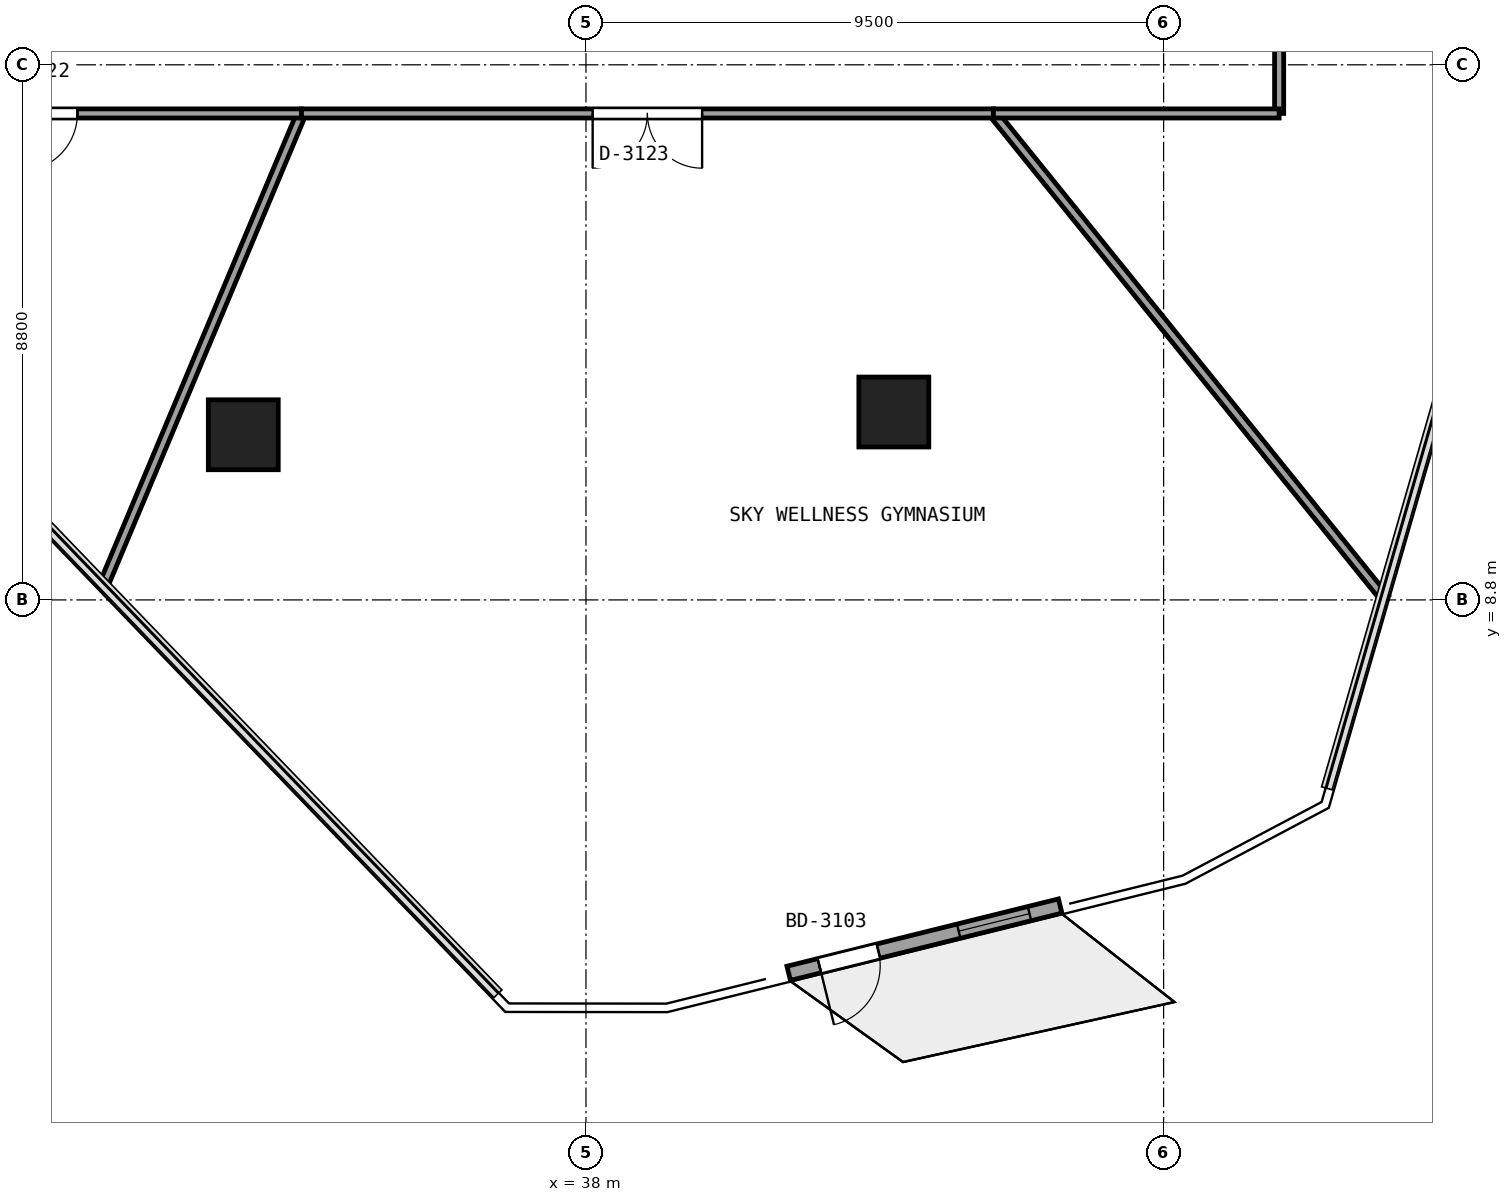
"""IFC4 building model, lengths in metres.
Left out: names, types, materials, properties, quantities, classifications, styles, units other than length and angle.
Written with IfcOpenShell. Run it as: python <this file> out.ifc"""

import sys

from ifc_helpers import new_model, si_unit, direction, frame, frame_2d, origin, origin_2d, place, context, subcontext, project, spatial, rectangle, extrude, element, fill, save


model = new_model("IFC4")
c1 = context("Model", 3, precision=1e-05, world=origin(), true_north=direction((0.0, 1.0)))
c2 = subcontext(c1, "Body", "Model", "MODEL_VIEW")
j1 = project(units=[si_unit("LENGTHUNIT", "METRE"), si_unit("PLANEANGLEUNIT", "RADIAN")], contexts=[c1])
p1 = place(None, origin())
s1 = spatial("IfcSite", under=j1, at=p1, CompositionType="ELEMENT")
p2 = place(p1, origin())
s2 = spatial("IfcBuilding", under=s1, at=p2, CompositionType="ELEMENT")
p3 = place(p2, frame((0.0, 0.0, 117.75)))
s3 = spatial("IfcBuildingStorey", under=s2, at=p3, CompositionType="ELEMENT", Elevation=117.75)
for number, where, z_axis, x_axis in (
    (1, (32.364, 11.516, 0.0), (0.0, 0.0, 1.0), (1.0, 0.0, 0.0)),
    (2, (43.063, 11.89, 0.0), (0.0, 0.0, 1.0), (1.0, 0.0, 0.0)),
):
    element("IfcColumn", number, at=place(p3, frame(where, z_axis=z_axis, x_axis=x_axis)), inside=s3, PredefinedType="COLUMN", context=c2, shape_type="SweptSolid", body=[
        extrude(rectangle(XDim=1.15, YDim=1.15, at=origin_2d()), origin(), (0.0, 0.0, 1.0), 3.09),
    ])
p4 = place(p3, frame((45.799, 3.766, 0.0), z_axis=(0.0, 0.0, 1.0), x_axis=(-0.970605863057, -0.240674590681, 0.0)))
e3 = element("IfcWall", 3, at=p4, inside=s3, PredefinedType="SOLIDWALL", context=c2, shape_type="SweptSolid", body=[
    extrude(rectangle(XDim=4.6, YDim=0.24, at=frame_2d((2.3, 0.0))), origin(), (0.0, 0.0, 1.0), 3.09),
])
p5 = place(p4, frame((3.08, 0.0, 0.0)))
e4 = element("IfcOpeningElement", 4, at=p5, cuts=e3, PredefinedType="OPENING", context=c2, shape_type="SweptSolid", body=[
    extrude(rectangle(XDim=1.0, YDim=2.15, at=frame_2d((0.5, 1.075))), frame((0.0, 0.13, 0.0), z_axis=(0.0, -1.0, 0.0), x_axis=(1.0, 0.0, 0.0)), (0.0, 0.0, 1.0), 0.26),
])
p6 = place(p4, frame((0.52, 0.0, 0.2)))
e5 = element("IfcOpeningElement", 5, at=p6, cuts=e3, PredefinedType="OPENING", context=c2, shape_type="SweptSolid", body=[
    extrude(rectangle(XDim=1.2, YDim=1.8, at=frame_2d((0.6, 0.9))), frame((0.0, 0.13, 0.0), z_axis=(0.0, -1.0, 0.0), x_axis=(1.0, 0.0, 0.0)), (0.0, 0.0, 1.0), 0.26),
])
p7 = place(p3, frame((30.051, 9.008, 0.0), z_axis=(0.0, 0.0, 1.0), x_axis=(0.386969195842, 0.922092642563, 0.0)))
e6 = element("IfcWall", 6, at=p7, inside=s3, PredefinedType="PARTITIONING", context=c2, shape_type="SweptSolid", body=[
    extrude(rectangle(XDim=8.45, YDim=0.15, at=frame_2d((4.225, 0.0))), origin(), (0.0, 0.0, 1.0), 2.375),
])
p8 = place(p3, frame((33.321, 16.8, 0.0), z_axis=(0.0, 0.0, 1.0), x_axis=(-1.0, 0.0, 0.0)))
e7 = element("IfcWall", 7, at=p8, inside=s3, PredefinedType="PARTITIONING", context=c2, shape_type="SweptSolid", body=[
    extrude(rectangle(XDim=8.321, YDim=0.15, at=frame_2d((4.161, 0.0))), origin(), (0.0, 0.0, 1.0), 2.375),
])
p9 = place(p8, frame((3.685, 0.0, 0.0)))
e8 = element("IfcOpeningElement", 8, at=p9, cuts=e7, PredefinedType="OPENING", context=c2, shape_type="SweptSolid", body=[
    extrude(rectangle(XDim=0.95, YDim=2.15, at=frame_2d((0.475, 1.075))), frame((0.0, 0.085, 0.0), z_axis=(0.0, -1.0, 0.0), x_axis=(1.0, 0.0, 0.0)), (0.0, 0.0, 1.0), 0.17),
])
p10 = place(p3, frame((51.141, 8.822, 0.0), z_axis=(0.0, 0.0, 1.0), x_axis=(-0.628181913261, 0.778066503489, 0.0)))
e9 = element("IfcWall", 9, at=p10, inside=s3, PredefinedType="PARTITIONING", context=c2, shape_type="SweptSolid", body=[
    extrude(rectangle(XDim=10.254, YDim=0.15, at=frame_2d((5.127, 0.0))), origin(), (0.0, 0.0, 1.0), 2.375),
])
p11 = place(p3, frame((44.7, 16.8, 0.0), z_axis=(0.0, 0.0, 1.0), x_axis=(-1.0, 0.0, 0.0)))
e10 = element("IfcWall", 10, at=p11, inside=s3, PredefinedType="PARTITIONING", context=c2, shape_type="SweptSolid", body=[
    extrude(rectangle(XDim=11.379, YDim=0.15, at=frame_2d((5.689, 0.0))), origin(), (0.0, 0.0, 1.0), 2.387),
])
p12 = place(p11, frame((4.79, 0.0, 0.0)))
e11 = element("IfcOpeningElement", 11, at=p12, cuts=e10, PredefinedType="OPENING", context=c2, shape_type="SweptSolid", body=[
    extrude(rectangle(XDim=1.8, YDim=2.25, at=frame_2d((0.9, 1.125))), frame((0.0, 0.085, 0.0), z_axis=(0.0, -1.0, 0.0), x_axis=(1.0, 0.0, 0.0)), (0.0, 0.0, 1.0), 0.17),
])
p13 = place(p3, frame((49.4, 18.6, 0.0), z_axis=(0.0, 0.0, 1.0), x_axis=(0.0, -1.0, 0.0)))
e12 = element("IfcWall", 12, at=p13, inside=s3, PredefinedType="PARTITIONING", context=c2, shape_type="SweptSolid", body=[
    extrude(rectangle(XDim=1.8, YDim=0.15, at=frame_2d((0.9, 0.0))), origin(), (0.0, 0.0, 1.0), 2.375),
])
p14 = place(p3, frame((49.4, 16.8, 0.0), z_axis=(0.0, 0.0, 1.0), x_axis=(-1.0, 0.0, 0.0)))
e13 = element("IfcWall", 13, at=p14, inside=s3, PredefinedType="PARTITIONING", context=c2, shape_type="SweptSolid", body=[
    extrude(rectangle(XDim=4.7, YDim=0.15, at=frame_2d((2.35, 0.0))), origin(), (0.0, 0.0, 1.0), 2.375),
])
p15 = place(p5, origin())
e14 = element("IfcDoor", 14, at=p15, inside=s3, OperationType="SINGLE_SWING_RIGHT", PredefinedType="DOOR", context=c2, shape_type="SweptSolid", body=[
    extrude(rectangle(XDim=1.0, YDim=2.15, at=frame_2d((0.5, 1.075))), frame((0.0, 0.025, 0.0), z_axis=(0.0, -1.0, 0.0), x_axis=(1.0, 0.0, 0.0)), (0.0, 0.0, 1.0), 0.05),
])
fill(e4, e14)
p16 = place(p6, origin())
e15 = element("IfcWindow", 15, at=p16, inside=s3, PartitioningType="SINGLE_PANEL", PredefinedType="WINDOW", context=c2, shape_type="SweptSolid", body=[
    extrude(rectangle(XDim=1.2, YDim=1.8, at=frame_2d((0.6, 0.9))), frame((0.0, 0.03, 0.0), z_axis=(0.0, -1.0, 0.0), x_axis=(1.0, 0.0, 0.0)), (0.0, 0.0, 1.0), 0.06),
])
fill(e5, e15)
p17 = place(p9, origin())
e16 = element("IfcDoor", 16, at=p17, inside=s3, OperationType="SINGLE_SWING_RIGHT", PredefinedType="DOOR", context=c2, shape_type="SweptSolid", body=[
    extrude(rectangle(XDim=0.95, YDim=2.15, at=frame_2d((0.475, 1.075))), frame((0.0, 0.025, 0.0), z_axis=(0.0, -1.0, 0.0), x_axis=(1.0, 0.0, 0.0)), (0.0, 0.0, 1.0), 0.05),
])
fill(e8, e16)
p18 = place(p12, origin())
e17 = element("IfcDoor", 17, at=p18, inside=s3, OperationType="DOUBLE_DOOR_SINGLE_SWING", PredefinedType="DOOR", context=c2, shape_type="SweptSolid", body=[
    extrude(rectangle(XDim=1.8, YDim=2.25, at=frame_2d((0.9, 1.125))), frame((0.0, 0.025, 0.0), z_axis=(0.0, -1.0, 0.0), x_axis=(1.0, 0.0, 0.0)), (0.0, 0.0, 1.0), 0.05),
])
fill(e11, e17)
save(model, sys.argv[1])
